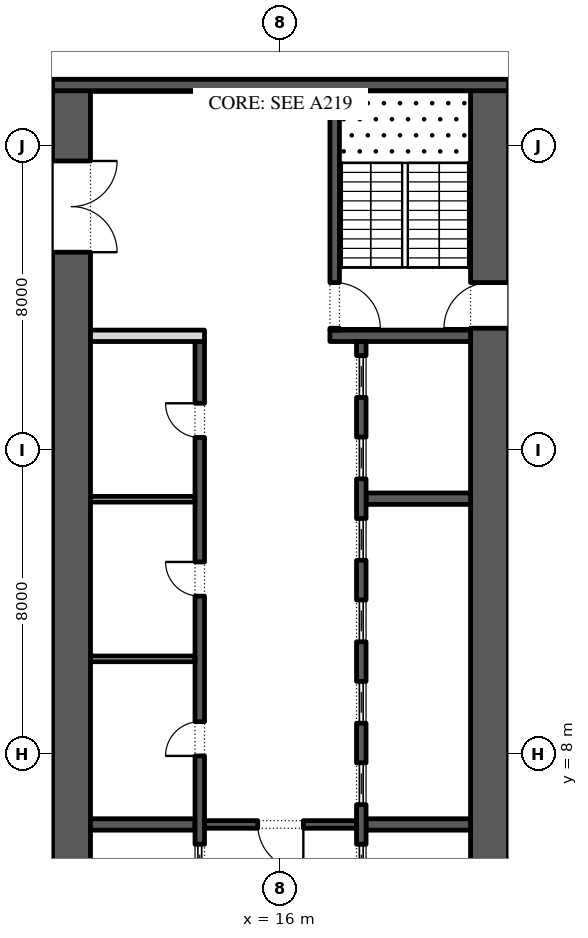
"""IFC4 building model, lengths in metres.
Left out: names, types, materials, properties, quantities, classifications, styles, units other than length and angle.
Written with IfcOpenShell. Run it as: python <this file> out.ifc"""

import sys

from ifc_helpers import new_model, si_unit, direction, frame, frame_2d, origin, place, context, subcontext, project, spatial, rectangle, extrude, element, fill, save


model = new_model("IFC4")
c1 = context("Model", 3, precision=1e-05, world=origin(), true_north=direction((0.0, 1.0)))
c2 = subcontext(c1, "Body", "Model", "MODEL_VIEW")
j1 = project(units=[si_unit("LENGTHUNIT", "METRE"), si_unit("PLANEANGLEUNIT", "RADIAN")], contexts=[c1])
p1 = place(None, origin())
s1 = spatial("IfcSite", under=j1, at=p1, CompositionType="ELEMENT")
p2 = place(p1, origin())
s2 = spatial("IfcBuilding", under=s1, at=p2, CompositionType="ELEMENT")
p3 = place(p2, frame((0.0, 0.0, 77.4)))
s3 = spatial("IfcBuildingStorey", under=s2, at=p3, CompositionType="ELEMENT", Elevation=77.4)
p4 = place(p3, frame((21.5, -2.45, 0.0), z_axis=(0.0, 0.0, 1.0), x_axis=(0.0, 1.0, 0.0)))
e1 = element("IfcWall", 1, at=p4, inside=s3, PredefinedType="SHEAR", context=c2, shape_type="SweptSolid", body=[
    extrude(rectangle(XDim=27.9, YDim=1.0, at=frame_2d((13.95, 0.0))), origin(), (0.0, 0.0, 1.0), 4.0),
])
p5 = place(p4, frame((5.05, 0.0, 0.0)))
e2 = element("IfcOpeningElement", 2, at=p5, cuts=e1, PredefinedType="OPENING", context=c2, shape_type="SweptSolid", body=[
    extrude(rectangle(XDim=1.2, YDim=2.1, at=frame_2d((0.6, 1.05))), frame((0.0, 0.51, 0.0), z_axis=(0.0, -1.0, 0.0), x_axis=(1.0, 0.0, 0.0)), (0.0, 0.0, 1.0), 1.02),
])
p6 = place(p4, frame((21.65, 0.0, 0.0)))
e3 = element("IfcOpeningElement", 3, at=p6, cuts=e1, PredefinedType="OPENING", context=c2, shape_type="SweptSolid", body=[
    extrude(rectangle(XDim=1.2, YDim=2.1, at=frame_2d((0.6, 1.05))), frame((0.0, 0.51, 0.0), z_axis=(0.0, -1.0, 0.0), x_axis=(1.0, 0.0, 0.0)), (0.0, 0.0, 1.0), 1.02),
])
p7 = place(p3, frame((10.5, -2.45, 0.0), z_axis=(0.0, 0.0, 1.0), x_axis=(0.0, 1.0, 0.0)))
e4 = element("IfcWall", 4, at=p7, inside=s3, PredefinedType="SHEAR", context=c2, shape_type="SweptSolid", body=[
    extrude(rectangle(XDim=27.9, YDim=1.0, at=frame_2d((13.95, 0.0))), origin(), (0.0, 0.0, 1.0), 4.0),
])
p8 = place(p7, frame((23.65, 0.0, 0.0)))
e5 = element("IfcOpeningElement", 5, at=p8, cuts=e4, PredefinedType="OPENING", context=c2, shape_type="SweptSolid", body=[
    extrude(rectangle(XDim=2.4, YDim=2.1, at=frame_2d((1.2, 1.05))), frame((0.0, 0.51, 0.0), z_axis=(0.0, -1.0, 0.0), x_axis=(1.0, 0.0, 0.0)), (0.0, 0.0, 1.0), 1.02),
])
p9 = place(p7, frame((0.788, 0.0, 0.0)))
e6 = element("IfcOpeningElement", 6, at=p9, cuts=e4, PredefinedType="OPENING", context=c2, shape_type="SweptSolid", body=[
    extrude(rectangle(XDim=0.9, YDim=2.1, at=frame_2d((0.45, 1.05))), frame((0.0, 0.51, 0.0), z_axis=(0.0, -1.0, 0.0), x_axis=(1.0, 0.0, 0.0)), (0.0, 0.0, 1.0), 1.02),
])
p10 = place(p7, frame((4.012, 0.0, 0.0)))
e7 = element("IfcOpeningElement", 7, at=p10, cuts=e4, PredefinedType="OPENING", context=c2, shape_type="SweptSolid", body=[
    extrude(rectangle(XDim=0.9, YDim=2.1, at=frame_2d((0.45, 1.05))), frame((0.0, 0.51, 0.0), z_axis=(0.0, -1.0, 0.0), x_axis=(1.0, 0.0, 0.0)), (0.0, 0.0, 1.0), 1.02),
])
p11 = place(p3, frame((10.0, 25.6, 0.0), z_axis=(0.0, 0.0, 1.0), x_axis=(1.0, 0.0, 0.0)))
e8 = element("IfcWall", 8, at=p11, inside=s3, PredefinedType="SHEAR", context=c2, shape_type="SweptSolid", body=[
    extrude(rectangle(XDim=12.0, YDim=0.3, at=frame_2d((6.0, 0.0))), origin(), (0.0, 0.0, 1.0), 4.0),
])
p12 = place(p3, frame((17.3, 19.0, 0.0), z_axis=(0.0, 0.0, 1.0), x_axis=(1.0, 0.0, 0.0)))
e9 = element("IfcWall", 9, at=p12, inside=s3, PredefinedType="SHEAR", context=c2, shape_type="SweptSolid", body=[
    extrude(rectangle(XDim=3.7, YDim=0.3, at=frame_2d((1.85, 0.0))), origin(), (0.0, 0.0, 1.0), 4.0),
])
p13 = place(p3, frame((17.425, 19.15, 0.0), z_axis=(0.0, 0.0, 1.0), x_axis=(0.0, 1.0, 0.0)))
e10 = element("IfcWall", 10, at=p13, inside=s3, PredefinedType="SHEAR", context=c2, shape_type="SweptSolid", body=[
    extrude(rectangle(XDim=6.3, YDim=0.25, at=frame_2d((3.15, 0.0))), origin(), (0.0, 0.0, 1.0), 4.0),
])
p14 = place(p13, frame((0.05, 0.0, 0.0)))
e11 = element("IfcOpeningElement", 11, at=p14, cuts=e10, PredefinedType="OPENING", context=c2, shape_type="SweptSolid", body=[
    extrude(rectangle(XDim=1.2, YDim=2.1, at=frame_2d((0.6, 1.05))), frame((0.0, 0.135, 0.0), z_axis=(0.0, -1.0, 0.0), x_axis=(1.0, 0.0, 0.0)), (0.0, 0.0, 1.0), 0.27),
])
for number, where, z_axis, x_axis in (
    (12, (18.25, 6.143, 0.0), (0.0, 0.0, 1.0), (1.0, 0.0, 0.0)),
    (13, (18.25, 14.714, 0.0), (0.0, 0.0, 1.0), (1.0, 0.0, 0.0)),
):
    element("IfcWall", number, at=place(p3, frame(where, z_axis=z_axis, x_axis=x_axis)), inside=s3, PredefinedType="SHEAR", context=c2, shape_type="SweptSolid", body=[
        extrude(rectangle(XDim=2.75, YDim=0.3, at=frame_2d((1.375, 0.0))), origin(), (0.0, 0.0, 1.0), 4.0),
    ])
p15 = place(p3, frame((18.125, 4.15, 0.0), z_axis=(0.0, 0.0, 1.0), x_axis=(0.0, 1.0, 0.0)))
e14 = element("IfcWall", 14, at=p15, inside=s3, PredefinedType="SHEAR", context=c2, shape_type="SweptSolid", body=[
    extrude(rectangle(XDim=14.7, YDim=0.25, at=frame_2d((7.35, 0.0))), origin(), (0.0, 0.0, 1.0), 4.0),
])
p16 = place(p15, frame((0.371, 0.0, 0.0)))
e15 = element("IfcOpeningElement", 15, at=p16, cuts=e14, PredefinedType="OPENING", context=c2, shape_type="SweptSolid", body=[
    extrude(rectangle(XDim=1.1, YDim=2.1, at=frame_2d((0.55, 1.05))), frame((0.0, 0.135, 0.0), z_axis=(0.0, -1.0, 0.0), x_axis=(1.0, 0.0, 0.0)), (0.0, 0.0, 1.0), 0.27),
])
p17 = place(p15, frame((2.514, 0.0, 0.0)))
e16 = element("IfcOpeningElement", 16, at=p17, cuts=e14, PredefinedType="OPENING", context=c2, shape_type="SweptSolid", body=[
    extrude(rectangle(XDim=1.1, YDim=2.1, at=frame_2d((0.55, 1.05))), frame((0.0, 0.135, 0.0), z_axis=(0.0, -1.0, 0.0), x_axis=(1.0, 0.0, 0.0)), (0.0, 0.0, 1.0), 0.27),
])
p18 = place(p15, frame((4.657, 0.0, 0.0)))
e17 = element("IfcOpeningElement", 17, at=p18, cuts=e14, PredefinedType="OPENING", context=c2, shape_type="SweptSolid", body=[
    extrude(rectangle(XDim=1.1, YDim=2.1, at=frame_2d((0.55, 1.05))), frame((0.0, 0.135, 0.0), z_axis=(0.0, -1.0, 0.0), x_axis=(1.0, 0.0, 0.0)), (0.0, 0.0, 1.0), 0.27),
])
p19 = place(p15, frame((6.8, 0.0, 0.0)))
e18 = element("IfcOpeningElement", 18, at=p19, cuts=e14, PredefinedType="OPENING", context=c2, shape_type="SweptSolid", body=[
    extrude(rectangle(XDim=1.1, YDim=2.1, at=frame_2d((0.55, 1.05))), frame((0.0, 0.135, 0.0), z_axis=(0.0, -1.0, 0.0), x_axis=(1.0, 0.0, 0.0)), (0.0, 0.0, 1.0), 0.27),
])
p20 = place(p15, frame((8.943, 0.0, 0.0)))
e19 = element("IfcOpeningElement", 19, at=p20, cuts=e14, PredefinedType="OPENING", context=c2, shape_type="SweptSolid", body=[
    extrude(rectangle(XDim=1.1, YDim=2.1, at=frame_2d((0.55, 1.05))), frame((0.0, 0.135, 0.0), z_axis=(0.0, -1.0, 0.0), x_axis=(1.0, 0.0, 0.0)), (0.0, 0.0, 1.0), 0.27),
])
p21 = place(p15, frame((11.086, 0.0, 0.0)))
e20 = element("IfcOpeningElement", 20, at=p21, cuts=e14, PredefinedType="OPENING", context=c2, shape_type="SweptSolid", body=[
    extrude(rectangle(XDim=1.1, YDim=2.1, at=frame_2d((0.55, 1.05))), frame((0.0, 0.135, 0.0), z_axis=(0.0, -1.0, 0.0), x_axis=(1.0, 0.0, 0.0)), (0.0, 0.0, 1.0), 0.27),
])
p22 = place(p15, frame((13.229, 0.0, 0.0)))
e21 = element("IfcOpeningElement", 21, at=p22, cuts=e14, PredefinedType="OPENING", context=c2, shape_type="SweptSolid", body=[
    extrude(rectangle(XDim=1.1, YDim=2.1, at=frame_2d((0.55, 1.05))), frame((0.0, 0.135, 0.0), z_axis=(0.0, -1.0, 0.0), x_axis=(1.0, 0.0, 0.0)), (0.0, 0.0, 1.0), 0.27),
])
p23 = place(p3, frame((11.0, 6.143, 0.0), z_axis=(0.0, 0.0, 1.0), x_axis=(1.0, 0.0, 0.0)))
e22 = element("IfcWall", 22, at=p23, inside=s3, PredefinedType="SHEAR", context=c2, shape_type="SweptSolid", body=[
    extrude(rectangle(XDim=2.75, YDim=0.3, at=frame_2d((1.375, 0.0))), origin(), (0.0, 0.0, 1.0), 4.0),
])
p24 = place(p3, frame((13.875, -2.45, 0.0), z_axis=(0.0, 0.0, 1.0), x_axis=(0.0, 1.0, 0.0)))
e23 = element("IfcWall", 23, at=p24, inside=s3, PredefinedType="SHEAR", context=c2, shape_type="SweptSolid", body=[
    extrude(rectangle(XDim=21.3, YDim=0.25, at=frame_2d((10.65, 0.0))), origin(), (0.0, 0.0, 1.0), 4.0),
])
p25 = place(p24, frame((10.396, 0.0, 0.0)))
e24 = element("IfcOpeningElement", 24, at=p25, cuts=e23, PredefinedType="OPENING", context=c2, shape_type="SweptSolid", body=[
    extrude(rectangle(XDim=0.9, YDim=2.1, at=frame_2d((0.45, 1.05))), frame((0.0, 0.135, 0.0), z_axis=(0.0, -1.0, 0.0), x_axis=(1.0, 0.0, 0.0)), (0.0, 0.0, 1.0), 0.27),
])
p26 = place(p24, frame((14.6, 0.0, 0.0)))
e25 = element("IfcOpeningElement", 25, at=p26, cuts=e23, PredefinedType="OPENING", context=c2, shape_type="SweptSolid", body=[
    extrude(rectangle(XDim=0.9, YDim=2.1, at=frame_2d((0.45, 1.05))), frame((0.0, 0.135, 0.0), z_axis=(0.0, -1.0, 0.0), x_axis=(1.0, 0.0, 0.0)), (0.0, 0.0, 1.0), 0.27),
])
p27 = place(p24, frame((18.775, 0.0, 0.0)))
e26 = element("IfcOpeningElement", 26, at=p27, cuts=e23, PredefinedType="OPENING", context=c2, shape_type="SweptSolid", body=[
    extrude(rectangle(XDim=0.9, YDim=2.1, at=frame_2d((0.45, 1.05))), frame((0.0, 0.135, 0.0), z_axis=(0.0, -1.0, 0.0), x_axis=(1.0, 0.0, 0.0)), (0.0, 0.0, 1.0), 0.27),
])
p28 = place(p24, frame((6.971, 0.0, 0.0)))
e27 = element("IfcOpeningElement", 27, at=p28, cuts=e23, PredefinedType="OPENING", context=c2, shape_type="SweptSolid", body=[
    extrude(rectangle(XDim=1.1, YDim=2.1, at=frame_2d((0.55, 1.05))), frame((0.0, 0.135, 0.0), z_axis=(0.0, -1.0, 0.0), x_axis=(1.0, 0.0, 0.0)), (0.0, 0.0, 1.0), 0.27),
])
p29 = place(p3, frame((11.0, 19.0, 0.0), z_axis=(0.0, 0.0, 1.0), x_axis=(1.0, 0.0, 0.0)))
e28 = element("IfcWall", 28, at=p29, inside=s3, PredefinedType="PARTITIONING", context=c2, shape_type="SweptSolid", body=[
    extrude(rectangle(XDim=3.0, YDim=0.3, at=frame_2d((1.5, 0.0))), origin(), (0.0, 0.0, 1.0), 4.0),
])
for number, where, z_axis, x_axis in (
    (29, (11.0, 10.5, 0.0), (0.0, 0.0, 1.0), (1.0, 0.0, 0.0)),
    (30, (11.0, 14.7, 0.0), (0.0, 0.0, 1.0), (1.0, 0.0, 0.0)),
):
    element("IfcWall", number, at=place(p3, frame(where, z_axis=z_axis, x_axis=x_axis)), inside=s3, PredefinedType="PARTITIONING", context=c2, shape_type="SweptSolid", body=[
        extrude(rectangle(XDim=2.75, YDim=0.15, at=frame_2d((1.375, 0.0))), origin(), (0.0, 0.0, 1.0), 4.0),
    ])
p30 = place(p3, frame((14.0, 6.143, 0.0), z_axis=(0.0, 0.0, 1.0), x_axis=(1.0, 0.0, 0.0)))
e31 = element("IfcWall", 31, at=p30, inside=s3, PredefinedType="SHEAR", context=c2, shape_type="SweptSolid", body=[
    extrude(rectangle(XDim=4.0, YDim=0.2, at=frame_2d((2.0, 0.0))), origin(), (0.0, 0.0, 1.0), 4.0),
])
p31 = place(p30, frame((1.4, 0.0, 0.0)))
e32 = element("IfcOpeningElement", 32, at=p31, cuts=e31, PredefinedType="OPENING", context=c2, shape_type="SweptSolid", body=[
    extrude(rectangle(XDim=1.2, YDim=2.1, at=frame_2d((0.6, 1.05))), frame((0.0, 0.11, 0.0), z_axis=(0.0, -1.0, 0.0), x_axis=(1.0, 0.0, 0.0)), (0.0, 0.0, 1.0), 0.22),
])
p32 = place(p16, origin())
e33 = element("IfcDoor", 33, at=p32, inside=s3, OperationType="SLIDING_TO_LEFT", PredefinedType="DOOR", context=c2, shape_type="SweptSolid", body=[
    extrude(rectangle(XDim=1.1, YDim=2.1, at=frame_2d((0.55, 1.05))), frame((0.0, 0.025, 0.0), z_axis=(0.0, -1.0, 0.0), x_axis=(1.0, 0.0, 0.0)), (0.0, 0.0, 1.0), 0.05),
])
fill(e15, e33)
p33 = place(p17, origin())
e34 = element("IfcDoor", 34, at=p33, inside=s3, OperationType="SLIDING_TO_LEFT", PredefinedType="DOOR", context=c2, shape_type="SweptSolid", body=[
    extrude(rectangle(XDim=1.1, YDim=2.1, at=frame_2d((0.55, 1.05))), frame((0.0, 0.025, 0.0), z_axis=(0.0, -1.0, 0.0), x_axis=(1.0, 0.0, 0.0)), (0.0, 0.0, 1.0), 0.05),
])
fill(e16, e34)
p34 = place(p18, origin())
e35 = element("IfcDoor", 35, at=p34, inside=s3, OperationType="SLIDING_TO_LEFT", PredefinedType="DOOR", context=c2, shape_type="SweptSolid", body=[
    extrude(rectangle(XDim=1.1, YDim=2.1, at=frame_2d((0.55, 1.05))), frame((0.0, 0.025, 0.0), z_axis=(0.0, -1.0, 0.0), x_axis=(1.0, 0.0, 0.0)), (0.0, 0.0, 1.0), 0.05),
])
fill(e17, e35)
p35 = place(p19, origin())
e36 = element("IfcDoor", 36, at=p35, inside=s3, OperationType="SLIDING_TO_LEFT", PredefinedType="DOOR", context=c2, shape_type="SweptSolid", body=[
    extrude(rectangle(XDim=1.1, YDim=2.1, at=frame_2d((0.55, 1.05))), frame((0.0, 0.025, 0.0), z_axis=(0.0, -1.0, 0.0), x_axis=(1.0, 0.0, 0.0)), (0.0, 0.0, 1.0), 0.05),
])
fill(e18, e36)
p36 = place(p20, origin())
e37 = element("IfcDoor", 37, at=p36, inside=s3, OperationType="SLIDING_TO_LEFT", PredefinedType="DOOR", context=c2, shape_type="SweptSolid", body=[
    extrude(rectangle(XDim=1.1, YDim=2.1, at=frame_2d((0.55, 1.05))), frame((0.0, 0.025, 0.0), z_axis=(0.0, -1.0, 0.0), x_axis=(1.0, 0.0, 0.0)), (0.0, 0.0, 1.0), 0.05),
])
fill(e19, e37)
p37 = place(p21, origin())
e38 = element("IfcDoor", 38, at=p37, inside=s3, OperationType="SLIDING_TO_LEFT", PredefinedType="DOOR", context=c2, shape_type="SweptSolid", body=[
    extrude(rectangle(XDim=1.1, YDim=2.1, at=frame_2d((0.55, 1.05))), frame((0.0, 0.025, 0.0), z_axis=(0.0, -1.0, 0.0), x_axis=(1.0, 0.0, 0.0)), (0.0, 0.0, 1.0), 0.05),
])
fill(e20, e38)
p38 = place(p22, origin())
e39 = element("IfcDoor", 39, at=p38, inside=s3, OperationType="SLIDING_TO_LEFT", PredefinedType="DOOR", context=c2, shape_type="SweptSolid", body=[
    extrude(rectangle(XDim=1.1, YDim=2.1, at=frame_2d((0.55, 1.05))), frame((0.0, 0.025, 0.0), z_axis=(0.0, -1.0, 0.0), x_axis=(1.0, 0.0, 0.0)), (0.0, 0.0, 1.0), 0.05),
])
fill(e21, e39)
p39 = place(p25, origin())
e40 = element("IfcDoor", 40, at=p39, inside=s3, OperationType="SINGLE_SWING_RIGHT", PredefinedType="DOOR", context=c2, shape_type="SweptSolid", body=[
    extrude(rectangle(XDim=0.9, YDim=2.1, at=frame_2d((0.45, 1.05))), frame((0.0, 0.125, 0.0), z_axis=(0.0, -1.0, 0.0), x_axis=(1.0, 0.0, 0.0)), (0.0, 0.0, 1.0), 0.05),
])
fill(e24, e40)
p40 = place(p26, origin())
e41 = element("IfcDoor", 41, at=p40, inside=s3, OperationType="SINGLE_SWING_LEFT", PredefinedType="DOOR", context=c2, shape_type="SweptSolid", body=[
    extrude(rectangle(XDim=0.9, YDim=2.1, at=frame_2d((0.45, 1.05))), frame((0.0, 0.125, 0.0), z_axis=(0.0, -1.0, 0.0), x_axis=(1.0, 0.0, 0.0)), (0.0, 0.0, 1.0), 0.05),
])
fill(e25, e41)
p41 = place(p27, origin())
e42 = element("IfcDoor", 42, at=p41, inside=s3, OperationType="SINGLE_SWING_LEFT", PredefinedType="DOOR", context=c2, shape_type="SweptSolid", body=[
    extrude(rectangle(XDim=0.9, YDim=2.1, at=frame_2d((0.45, 1.05))), frame((0.0, 0.125, 0.0), z_axis=(0.0, -1.0, 0.0), x_axis=(1.0, 0.0, 0.0)), (0.0, 0.0, 1.0), 0.05),
])
fill(e26, e42)
p42 = place(p28, origin())
e43 = element("IfcDoor", 43, at=p42, inside=s3, OperationType="SLIDING_TO_LEFT", PredefinedType="DOOR", context=c2, shape_type="SweptSolid", body=[
    extrude(rectangle(XDim=1.1, YDim=2.1, at=frame_2d((0.55, 1.05))), frame((0.0, 0.025, 0.0), z_axis=(0.0, -1.0, 0.0), x_axis=(1.0, 0.0, 0.0)), (0.0, 0.0, 1.0), 0.05),
])
fill(e27, e43)
p43 = place(p31, frame((1.2, 0.0, 0.0), z_axis=(0.0, 0.0, 1.0), x_axis=(-1.0, 0.0, 0.0)))
e44 = element("IfcDoor", 44, at=p43, inside=s3, OperationType="SINGLE_SWING_RIGHT", PredefinedType="DOOR", context=c2, shape_type="SweptSolid", body=[
    extrude(rectangle(XDim=1.2, YDim=2.1, at=frame_2d((0.6, 1.05))), frame((0.0, 0.025, 0.0), z_axis=(0.0, -1.0, 0.0), x_axis=(1.0, 0.0, 0.0)), (0.0, 0.0, 1.0), 0.05),
])
fill(e32, e44)
p44 = place(p8, frame((2.4, 0.0, 0.0), z_axis=(0.0, 0.0, 1.0), x_axis=(-1.0, 0.0, 0.0)))
e45 = element("IfcDoor", 45, at=p44, inside=s3, OperationType="DOUBLE_DOOR_SINGLE_SWING", PredefinedType="DOOR", context=c2, shape_type="SweptSolid", body=[
    extrude(rectangle(XDim=2.4, YDim=2.1, at=frame_2d((1.2, 1.05))), frame((0.0, 0.025, 0.0), z_axis=(0.0, -1.0, 0.0), x_axis=(1.0, 0.0, 0.0)), (0.0, 0.0, 1.0), 0.05),
])
fill(e5, e45)
p45 = place(p14, frame((1.2, 0.0, 0.0), z_axis=(0.0, 0.0, 1.0), x_axis=(-1.0, 0.0, 0.0)))
e46 = element("IfcDoor", 46, at=p45, inside=s3, OperationType="SINGLE_SWING_LEFT", PredefinedType="DOOR", context=c2, shape_type="SweptSolid", body=[
    extrude(rectangle(XDim=1.2, YDim=2.1, at=frame_2d((0.6, 1.05))), frame((0.0, 0.025, 0.0), z_axis=(0.0, -1.0, 0.0), x_axis=(1.0, 0.0, 0.0)), (0.0, 0.0, 1.0), 0.05),
])
fill(e11, e46)
p46 = place(p6, origin())
e47 = element("IfcDoor", 47, at=p46, inside=s3, OperationType="SINGLE_SWING_RIGHT", PredefinedType="DOOR", context=c2, shape_type="SweptSolid", body=[
    extrude(rectangle(XDim=1.2, YDim=2.1, at=frame_2d((0.6, 1.05))), frame((0.0, 0.025, 0.0), z_axis=(0.0, -1.0, 0.0), x_axis=(1.0, 0.0, 0.0)), (0.0, 0.0, 1.0), 0.05),
])
fill(e3, e47)
save(model, sys.argv[1])
